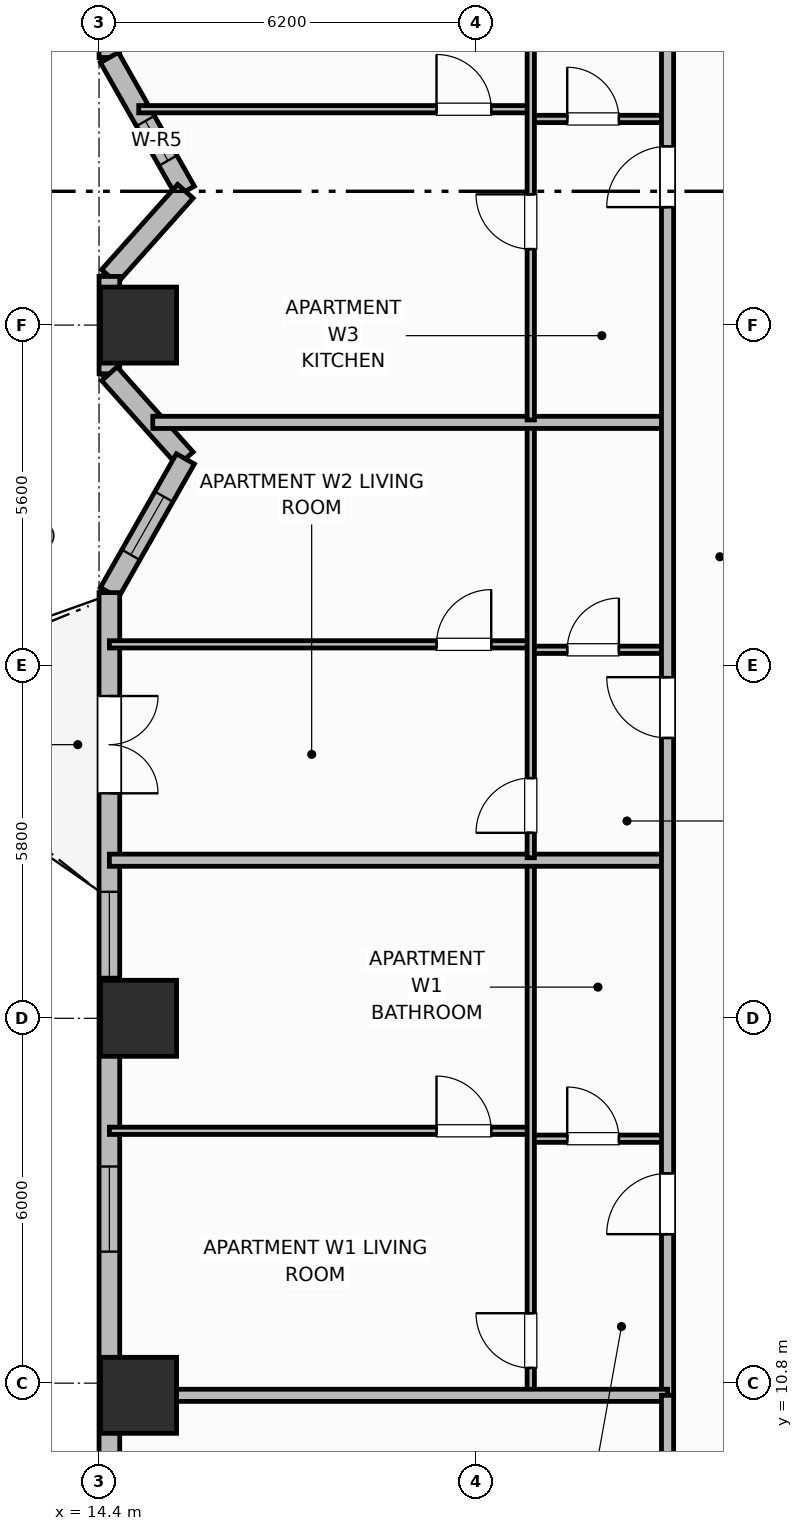
"""IFC4 building model, lengths in metres.
Left out: names, types, materials, properties, quantities, classifications, styles, units other than length and angle.
Written with IfcOpenShell. Run it as: python <this file> out.ifc"""

import sys

from ifc_helpers import new_model, si_unit, direction, frame, frame_2d, origin, origin_2d, place, context, subcontext, project, spatial, rectangle, extrude, element, fill, save


model = new_model("IFC4")
c1 = context("Model", 3, precision=1e-05, world=origin(), true_north=direction((0.0, 1.0)))
c2 = subcontext(c1, "Body", "Model", "MODEL_VIEW")
j1 = project(units=[si_unit("LENGTHUNIT", "METRE"), si_unit("PLANEANGLEUNIT", "RADIAN")], contexts=[c1])
p1 = place(None, origin())
s1 = spatial("IfcSite", under=j1, at=p1, CompositionType="ELEMENT")
p2 = place(p1, origin())
s2 = spatial("IfcBuilding", under=s1, at=p2, CompositionType="ELEMENT")
p3 = place(p2, frame((0.0, 0.0, 51.0)))
s3 = spatial("IfcBuildingStorey", under=s2, at=p3, CompositionType="ELEMENT", Elevation=51.0)
for number, where, z_axis, x_axis in (
    (1, (15.05, 10.6, 0.0), (0.0, 0.0, 1.0), (1.0, 0.0, 0.0)),
    (2, (15.05, 16.8, 0.0), (0.0, 0.0, 1.0), (1.0, 0.0, 0.0)),
    (3, (15.05, 28.2, 0.0), (0.0, 0.0, 1.0), (1.0, 0.0, 0.0)),
):
    element("IfcColumn", number, at=place(p3, frame(where, z_axis=z_axis, x_axis=x_axis)), inside=s3, PredefinedType="COLUMN", context=c2, shape_type="SweptSolid", body=[
        extrude(rectangle(XDim=1.25, YDim=1.25, at=origin_2d()), origin(), (0.0, 0.0, 1.0), 3.7),
    ])
p4 = place(p3, frame((14.57, 47.4, 0.0), z_axis=(0.0, 0.0, 1.0), x_axis=(0.0, -1.0, 0.0)))
e4 = element("IfcWall", 4, at=p4, inside=s3, PredefinedType="SOLIDWALL", context=c2, shape_type="SweptSolid", body=[
    extrude(rectangle(XDim=14.8, YDim=0.34, at=frame_2d((7.4, 0.0))), origin(), (0.0, 0.0, 1.0), 2.7),
])
p5 = place(p4, frame((3.863, 0.0, 0.68)))
e5 = element("IfcOpeningElement", 5, at=p5, cuts=e4, PredefinedType="OPENING", context=c2, shape_type="SweptSolid", body=[
    extrude(rectangle(XDim=1.6, YDim=1.9, at=frame_2d((0.8, 0.95))), frame((0.0, 0.18, 0.0), z_axis=(0.0, -1.0, 0.0), x_axis=(1.0, 0.0, 0.0)), (0.0, 0.0, 1.0), 0.36),
])
p6 = place(p4, frame((11.663, 0.0, 0.68)))
e6 = element("IfcOpeningElement", 6, at=p6, cuts=e4, PredefinedType="OPENING", context=c2, shape_type="SweptSolid", body=[
    extrude(rectangle(XDim=1.6, YDim=1.9, at=frame_2d((0.8, 0.95))), frame((0.0, 0.18, 0.0), z_axis=(0.0, -1.0, 0.0), x_axis=(1.0, 0.0, 0.0)), (0.0, 0.0, 1.0), 0.36),
])
p7 = place(p3, frame((14.57, 32.6, 0.0), z_axis=(0.0, 0.0, 1.0), x_axis=(0.493976255291, -0.869475393101, 0.0)))
e7 = element("IfcWall", 7, at=p7, inside=s3, PredefinedType="SOLIDWALL", context=c2, shape_type="SweptSolid", body=[
    extrude(rectangle(XDim=2.531, YDim=0.34, at=frame_2d((1.265, 0.0))), origin(), (0.0, 0.0, 1.0), 2.7),
])
p8 = place(p7, frame((1.2, 0.0, 0.89)))
e8 = element("IfcOpeningElement", 8, at=p8, cuts=e7, PredefinedType="OPENING", context=c2, shape_type="SweptSolid", body=[
    extrude(rectangle(XDim=0.75, YDim=1.65, at=frame_2d((0.375, 0.825))), frame((0.0, 0.18, 0.0), z_axis=(0.0, -1.0, 0.0), x_axis=(1.0, 0.0, 0.0)), (0.0, 0.0, 1.0), 0.36),
])
p9 = place(p3, frame((15.82, 30.4, 0.0), z_axis=(0.0, 0.0, 1.0), x_axis=(-0.666041619974, -0.74591457987, 0.0)))
e9 = element("IfcWall", 9, at=p9, inside=s3, PredefinedType="SOLIDWALL", context=c2, shape_type="SweptSolid", body=[
    extrude(rectangle(XDim=1.877, YDim=0.34, at=frame_2d((0.938, 0.0))), origin(), (0.0, 0.0, 1.0), 2.7),
])
p10 = place(p3, frame((14.57, 29.0, 0.0), z_axis=(0.0, 0.0, 1.0), x_axis=(0.0, -1.0, 0.0)))
e10 = element("IfcWall", 10, at=p10, inside=s3, PredefinedType="SOLIDWALL", context=c2, shape_type="SweptSolid", body=[
    extrude(rectangle(XDim=1.6, YDim=0.34, at=frame_2d((0.8, 0.0))), origin(), (0.0, 0.0, 1.0), 2.7),
])
p11 = place(p3, frame((14.57, 27.4, 0.0), z_axis=(0.0, 0.0, 1.0), x_axis=(0.666041619974, -0.74591457987, 0.0)))
e11 = element("IfcWall", 11, at=p11, inside=s3, PredefinedType="SOLIDWALL", context=c2, shape_type="SweptSolid", body=[
    extrude(rectangle(XDim=1.877, YDim=0.34, at=frame_2d((0.938, 0.0))), origin(), (0.0, 0.0, 1.0), 2.7),
])
p12 = place(p3, frame((15.82, 26.0, 0.0), z_axis=(0.0, 0.0, 1.0), x_axis=(-0.494017696272, -0.869451847873, 0.0)))
e12 = element("IfcWall", 12, at=p12, inside=s3, PredefinedType="SOLIDWALL", context=c2, shape_type="SweptSolid", body=[
    extrude(rectangle(XDim=2.53, YDim=0.34, at=frame_2d((1.265, 0.0))), origin(), (0.0, 0.0, 1.0), 2.7),
])
p13 = place(p12, frame((0.715, 0.0, 0.89)))
e13 = element("IfcOpeningElement", 13, at=p13, cuts=e12, PredefinedType="OPENING", context=c2, shape_type="SweptSolid", body=[
    extrude(rectangle(XDim=1.1, YDim=1.65, at=frame_2d((0.55, 0.825))), frame((0.0, 0.18, 0.0), z_axis=(0.0, -1.0, 0.0), x_axis=(1.0, 0.0, 0.0)), (0.0, 0.0, 1.0), 0.36),
])
p14 = place(p3, frame((14.57, 23.8, 0.0), z_axis=(0.0, 0.0, 1.0), x_axis=(0.0, -1.0, 0.0)))
e14 = element("IfcWall", 14, at=p14, inside=s3, PredefinedType="SOLIDWALL", context=c2, shape_type="SweptSolid", body=[
    extrude(rectangle(XDim=14.8, YDim=0.34, at=frame_2d((7.4, 0.0))), origin(), (0.0, 0.0, 1.0), 2.7),
])
p15 = place(p14, frame((1.7, 0.0, 0.0)))
e15 = element("IfcOpeningElement", 15, at=p15, cuts=e14, PredefinedType="OPENING", context=c2, shape_type="SweptSolid", body=[
    extrude(rectangle(XDim=1.6, YDim=2.1, at=frame_2d((0.8, 1.05))), frame((0.0, 0.18, 0.0), z_axis=(0.0, -1.0, 0.0), x_axis=(1.0, 0.0, 0.0)), (0.0, 0.0, 1.0), 0.36),
])
p16 = place(p14, frame((4.92, 0.0, 0.69)))
e16 = element("IfcOpeningElement", 16, at=p16, cuts=e14, PredefinedType="OPENING", context=c2, shape_type="SweptSolid", body=[
    extrude(rectangle(XDim=1.4, YDim=1.85, at=frame_2d((0.7, 0.925))), frame((0.0, 0.18, 0.0), z_axis=(0.0, -1.0, 0.0), x_axis=(1.0, 0.0, 0.0)), (0.0, 0.0, 1.0), 0.36),
])
p17 = place(p14, frame((9.438, 0.0, 0.73)))
e17 = element("IfcOpeningElement", 17, at=p17, cuts=e14, PredefinedType="OPENING", context=c2, shape_type="SweptSolid", body=[
    extrude(rectangle(XDim=1.4, YDim=1.85, at=frame_2d((0.7, 0.925))), frame((0.0, 0.18, 0.0), z_axis=(0.0, -1.0, 0.0), x_axis=(1.0, 0.0, 0.0)), (0.0, 0.0, 1.0), 0.36),
])
p18 = place(p3, frame((21.5, 14.82, 0.0), z_axis=(0.0, 0.0, 1.0), x_axis=(1.0, 0.0, 0.0)))
e18 = element("IfcWall", 18, at=p18, inside=s3, PredefinedType="PARTITIONING", context=c2, shape_type="SweptSolid", body=[
    extrude(rectangle(XDim=2.25, YDim=0.12, at=frame_2d((1.125, 0.0))), origin(), (0.0, 0.0, 1.0), 2.53),
])
p19 = place(p18, frame((0.6, 0.0, 0.0)))
e19 = element("IfcOpeningElement", 19, at=p19, cuts=e18, PredefinedType="OPENING", context=c2, shape_type="SweptSolid", body=[
    extrude(rectangle(XDim=0.85, YDim=2.1, at=frame_2d((0.425, 1.05))), frame((0.0, 0.07, 0.0), z_axis=(0.0, -1.0, 0.0), x_axis=(1.0, 0.0, 0.0)), (0.0, 0.0, 1.0), 0.14),
])
p20 = place(p3, frame((14.57, 14.95, 0.0), z_axis=(0.0, 0.0, 1.0), x_axis=(1.0, 0.0, 0.0)))
e20 = element("IfcWall", 20, at=p20, inside=s3, PredefinedType="PARTITIONING", context=c2, shape_type="SweptSolid", body=[
    extrude(rectangle(XDim=6.93, YDim=0.12, at=frame_2d((3.465, 0.0))), origin(), (0.0, 0.0, 1.0), 2.53),
])
p21 = place(p20, frame((5.38, 0.0, 0.0)))
e21 = element("IfcOpeningElement", 21, at=p21, cuts=e20, PredefinedType="OPENING", context=c2, shape_type="SweptSolid", body=[
    extrude(rectangle(XDim=0.9, YDim=2.1, at=frame_2d((0.45, 1.05))), frame((0.0, 0.07, 0.0), z_axis=(0.0, -1.0, 0.0), x_axis=(1.0, 0.0, 0.0)), (0.0, 0.0, 1.0), 0.14),
])
p22 = place(p3, frame((21.5, 10.64, 0.0), z_axis=(0.0, 0.0, 1.0), x_axis=(0.0, 1.0, 0.0)))
e22 = element("IfcWall", 22, at=p22, inside=s3, PredefinedType="PARTITIONING", context=c2, shape_type="SweptSolid", body=[
    extrude(rectangle(XDim=8.72, YDim=0.12, at=frame_2d((4.36, 0.0))), origin(), (0.0, 0.0, 1.0), 2.53),
])
p23 = place(p22, frame((0.41, 0.0, 0.0)))
e23 = element("IfcOpeningElement", 23, at=p23, cuts=e22, PredefinedType="OPENING", context=c2, shape_type="SweptSolid", body=[
    extrude(rectangle(XDim=0.9, YDim=2.1, at=frame_2d((0.45, 1.05))), frame((0.0, 0.07, 0.0), z_axis=(0.0, -1.0, 0.0), x_axis=(1.0, 0.0, 0.0)), (0.0, 0.0, 1.0), 0.14),
])
p24 = place(p3, frame((14.57, 19.4, 0.0), z_axis=(0.0, 0.0, 1.0), x_axis=(1.0, 0.0, 0.0)))
e24 = element("IfcWall", 24, at=p24, inside=s3, PredefinedType="PARTITIONING", context=c2, shape_type="SweptSolid", body=[
    extrude(rectangle(XDim=9.18, YDim=0.2, at=frame_2d((4.59, 0.0))), origin(), (0.0, 0.0, 1.0), 2.53),
])
p25 = place(p3, frame((21.5, 22.86, 0.0), z_axis=(0.0, 0.0, 1.0), x_axis=(1.0, 0.0, 0.0)))
e25 = element("IfcWall", 25, at=p25, inside=s3, PredefinedType="PARTITIONING", context=c2, shape_type="SweptSolid", body=[
    extrude(rectangle(XDim=2.25, YDim=0.12, at=frame_2d((1.125, 0.0))), origin(), (0.0, 0.0, 1.0), 2.53),
])
p26 = place(p25, frame((0.6, 0.0, 0.0)))
e26 = element("IfcOpeningElement", 26, at=p26, cuts=e25, PredefinedType="OPENING", context=c2, shape_type="SweptSolid", body=[
    extrude(rectangle(XDim=0.85, YDim=2.1, at=frame_2d((0.425, 1.05))), frame((0.0, 0.07, 0.0), z_axis=(0.0, -1.0, 0.0), x_axis=(1.0, 0.0, 0.0)), (0.0, 0.0, 1.0), 0.14),
])
p27 = place(p3, frame((14.57, 22.95, 0.0), z_axis=(0.0, 0.0, 1.0), x_axis=(1.0, 0.0, 0.0)))
e27 = element("IfcWall", 27, at=p27, inside=s3, PredefinedType="PARTITIONING", context=c2, shape_type="SweptSolid", body=[
    extrude(rectangle(XDim=6.93, YDim=0.12, at=frame_2d((3.465, 0.0))), origin(), (0.0, 0.0, 1.0), 2.53),
])
p28 = place(p27, frame((5.38, 0.0, 0.0)))
e28 = element("IfcOpeningElement", 28, at=p28, cuts=e27, PredefinedType="OPENING", context=c2, shape_type="SweptSolid", body=[
    extrude(rectangle(XDim=0.9, YDim=2.1, at=frame_2d((0.45, 1.05))), frame((0.0, 0.07, 0.0), z_axis=(0.0, -1.0, 0.0), x_axis=(1.0, 0.0, 0.0)), (0.0, 0.0, 1.0), 0.14),
])
p29 = place(p3, frame((21.5, 19.44, 0.0), z_axis=(0.0, 0.0, 1.0), x_axis=(0.0, 1.0, 0.0)))
e29 = element("IfcWall", 29, at=p29, inside=s3, PredefinedType="PARTITIONING", context=c2, shape_type="SweptSolid", body=[
    extrude(rectangle(XDim=7.12, YDim=0.12, at=frame_2d((3.56, 0.0))), origin(), (0.0, 0.0, 1.0), 2.53),
])
p30 = place(p29, frame((0.41, 0.0, 0.0)))
e30 = element("IfcOpeningElement", 30, at=p30, cuts=e29, PredefinedType="OPENING", context=c2, shape_type="SweptSolid", body=[
    extrude(rectangle(XDim=0.9, YDim=2.1, at=frame_2d((0.45, 1.05))), frame((0.0, 0.07, 0.0), z_axis=(0.0, -1.0, 0.0), x_axis=(1.0, 0.0, 0.0)), (0.0, 0.0, 1.0), 0.14),
])
p31 = place(p3, frame((15.284, 26.6, 0.0), z_axis=(0.0, 0.0, 1.0), x_axis=(1.0, 0.0, 0.0)))
e31 = element("IfcWall", 31, at=p31, inside=s3, PredefinedType="PARTITIONING", context=c2, shape_type="SweptSolid", body=[
    extrude(rectangle(XDim=8.466, YDim=0.2, at=frame_2d((4.233, 0.0))), origin(), (0.0, 0.0, 1.0), 2.53),
])
p32 = place(p3, frame((21.5, 31.59, 0.0), z_axis=(0.0, 0.0, 1.0), x_axis=(1.0, 0.0, 0.0)))
e32 = element("IfcWall", 32, at=p32, inside=s3, PredefinedType="PARTITIONING", context=c2, shape_type="SweptSolid", body=[
    extrude(rectangle(XDim=2.25, YDim=0.12, at=frame_2d((1.125, 0.0))), origin(), (0.0, 0.0, 1.0), 2.53),
])
p33 = place(p32, frame((0.6, 0.0, 0.0)))
e33 = element("IfcOpeningElement", 33, at=p33, cuts=e32, PredefinedType="OPENING", context=c2, shape_type="SweptSolid", body=[
    extrude(rectangle(XDim=0.85, YDim=2.1, at=frame_2d((0.425, 1.05))), frame((0.0, 0.07, 0.0), z_axis=(0.0, -1.0, 0.0), x_axis=(1.0, 0.0, 0.0)), (0.0, 0.0, 1.0), 0.14),
])
p34 = place(p3, frame((15.053, 31.75, 0.0), z_axis=(0.0, 0.0, 1.0), x_axis=(1.0, 0.0, 0.0)))
e34 = element("IfcWall", 34, at=p34, inside=s3, PredefinedType="PARTITIONING", context=c2, shape_type="SweptSolid", body=[
    extrude(rectangle(XDim=6.447, YDim=0.12, at=frame_2d((3.224, 0.0))), origin(), (0.0, 0.0, 1.0), 2.53),
])
p35 = place(p34, frame((4.897, 0.0, 0.0)))
e35 = element("IfcOpeningElement", 35, at=p35, cuts=e34, PredefinedType="OPENING", context=c2, shape_type="SweptSolid", body=[
    extrude(rectangle(XDim=0.9, YDim=2.1, at=frame_2d((0.45, 1.05))), frame((0.0, 0.07, 0.0), z_axis=(0.0, -1.0, 0.0), x_axis=(1.0, 0.0, 0.0)), (0.0, 0.0, 1.0), 0.14),
])
p36 = place(p3, frame((21.5, 26.64, 0.0), z_axis=(0.0, 0.0, 1.0), x_axis=(0.0, 1.0, 0.0)))
e36 = element("IfcWall", 36, at=p36, inside=s3, PredefinedType="PARTITIONING", context=c2, shape_type="SweptSolid", body=[
    extrude(rectangle(XDim=10.32, YDim=0.12, at=frame_2d((5.16, 0.0))), origin(), (0.0, 0.0, 1.0), 2.53),
])
p37 = place(p36, frame((2.81, 0.0, 0.0)))
e37 = element("IfcOpeningElement", 37, at=p37, cuts=e36, PredefinedType="OPENING", context=c2, shape_type="SweptSolid", body=[
    extrude(rectangle(XDim=0.9, YDim=2.1, at=frame_2d((0.45, 1.05))), frame((0.0, 0.07, 0.0), z_axis=(0.0, -1.0, 0.0), x_axis=(1.0, 0.0, 0.0)), (0.0, 0.0, 1.0), 0.14),
])
p38 = place(p3, frame((23.75, 10.6, 0.0), z_axis=(0.0, 0.0, 1.0), x_axis=(0.0, 1.0, 0.0)))
e38 = element("IfcWall", 38, at=p38, inside=s3, PredefinedType="PARTITIONING", context=c2, shape_type="SweptSolid", body=[
    extrude(rectangle(XDim=35.2, YDim=0.2, at=frame_2d((17.6, 0.0))), origin(), (0.0, 0.0, 1.0), 2.53),
])
p39 = place(p38, frame((2.65, 0.0, 0.0)))
e39 = element("IfcOpeningElement", 39, at=p39, cuts=e38, PredefinedType="OPENING", context=c2, shape_type="SweptSolid", body=[
    extrude(rectangle(XDim=1.0, YDim=2.15, at=frame_2d((0.5, 1.075))), frame((0.0, 0.11, 0.0), z_axis=(0.0, -1.0, 0.0), x_axis=(1.0, 0.0, 0.0)), (0.0, 0.0, 1.0), 0.22),
])
p40 = place(p38, frame((10.81, 0.0, 0.0)))
e40 = element("IfcOpeningElement", 40, at=p40, cuts=e38, PredefinedType="OPENING", context=c2, shape_type="SweptSolid", body=[
    extrude(rectangle(XDim=1.0, YDim=2.15, at=frame_2d((0.5, 1.075))), frame((0.0, 0.11, 0.0), z_axis=(0.0, -1.0, 0.0), x_axis=(1.0, 0.0, 0.0)), (0.0, 0.0, 1.0), 0.22),
])
p41 = place(p38, frame((19.54, 0.0, 0.0)))
e41 = element("IfcOpeningElement", 41, at=p41, cuts=e38, PredefinedType="OPENING", context=c2, shape_type="SweptSolid", body=[
    extrude(rectangle(XDim=1.0, YDim=2.15, at=frame_2d((0.5, 1.075))), frame((0.0, 0.11, 0.0), z_axis=(0.0, -1.0, 0.0), x_axis=(1.0, 0.0, 0.0)), (0.0, 0.0, 1.0), 0.22),
])
p42 = place(p38, frame((26.95, 0.0, 0.0)))
e42 = element("IfcOpeningElement", 42, at=p42, cuts=e38, PredefinedType="OPENING", context=c2, shape_type="SweptSolid", body=[
    extrude(rectangle(XDim=1.0, YDim=2.15, at=frame_2d((0.5, 1.075))), frame((0.0, 0.11, 0.0), z_axis=(0.0, -1.0, 0.0), x_axis=(1.0, 0.0, 0.0)), (0.0, 0.0, 1.0), 0.22),
])
p43 = place(p3, frame((14.99, 10.6, 0.0), z_axis=(0.0, 0.0, 1.0), x_axis=(1.0, 0.0, 0.0)))
e43 = element("IfcWall", 43, at=p43, inside=s3, PredefinedType="PARTITIONING", context=c2, shape_type="SweptSolid", body=[
    extrude(rectangle(XDim=8.76, YDim=0.2, at=frame_2d((4.38, 0.0))), origin(), (0.0, 0.0, 1.0), 2.53),
])
p44 = place(p3, frame((23.75, 4.97, 0.0), z_axis=(0.0, 0.0, 1.0), x_axis=(0.0, 1.0, 0.0)))
e44 = element("IfcWall", 44, at=p44, inside=s3, PredefinedType="PARTITIONING", context=c2, shape_type="SweptSolid", body=[
    extrude(rectangle(XDim=5.63, YDim=0.2, at=frame_2d((2.815, 0.0))), origin(), (0.0, 0.0, 1.0), 2.53),
])
p45 = place(p8, origin())
e45 = element("IfcWindow", 45, at=p45, inside=s3, PartitioningType="SINGLE_PANEL", PredefinedType="WINDOW", context=c2, shape_type="SweptSolid", body=[
    extrude(rectangle(XDim=0.75, YDim=1.65, at=frame_2d((0.375, 0.825))), frame((0.0, 0.03, 0.0), z_axis=(0.0, -1.0, 0.0), x_axis=(1.0, 0.0, 0.0)), (0.0, 0.0, 1.0), 0.06),
])
fill(e8, e45)
p46 = place(p13, origin())
e46 = element("IfcWindow", 46, at=p46, inside=s3, PartitioningType="SINGLE_PANEL", PredefinedType="WINDOW", context=c2, shape_type="SweptSolid", body=[
    extrude(rectangle(XDim=1.1, YDim=1.65, at=frame_2d((0.55, 0.825))), frame((0.0, 0.03, 0.0), z_axis=(0.0, -1.0, 0.0), x_axis=(1.0, 0.0, 0.0)), (0.0, 0.0, 1.0), 0.06),
])
fill(e13, e46)
p47 = place(p15, origin())
e47 = element("IfcDoor", 47, at=p47, inside=s3, OperationType="DOUBLE_DOOR_SINGLE_SWING", PredefinedType="DOOR", context=c2, shape_type="SweptSolid", body=[
    extrude(rectangle(XDim=1.6, YDim=2.1, at=frame_2d((0.8, 1.05))), frame((0.0, 0.025, 0.0), z_axis=(0.0, -1.0, 0.0), x_axis=(1.0, 0.0, 0.0)), (0.0, 0.0, 1.0), 0.05),
])
fill(e15, e47)
p48 = place(p16, origin())
e48 = element("IfcWindow", 48, at=p48, inside=s3, PartitioningType="SINGLE_PANEL", PredefinedType="WINDOW", context=c2, shape_type="SweptSolid", body=[
    extrude(rectangle(XDim=1.4, YDim=1.85, at=frame_2d((0.7, 0.925))), frame((0.0, 0.03, 0.0), z_axis=(0.0, -1.0, 0.0), x_axis=(1.0, 0.0, 0.0)), (0.0, 0.0, 1.0), 0.06),
])
fill(e16, e48)
p49 = place(p17, origin())
e49 = element("IfcWindow", 49, at=p49, inside=s3, PartitioningType="SINGLE_PANEL", PredefinedType="WINDOW", context=c2, shape_type="SweptSolid", body=[
    extrude(rectangle(XDim=1.4, YDim=1.85, at=frame_2d((0.7, 0.925))), frame((0.0, 0.03, 0.0), z_axis=(0.0, -1.0, 0.0), x_axis=(1.0, 0.0, 0.0)), (0.0, 0.0, 1.0), 0.06),
])
fill(e17, e49)
p50 = place(p19, origin())
e50 = element("IfcDoor", 50, at=p50, inside=s3, OperationType="SINGLE_SWING_LEFT", PredefinedType="DOOR", context=c2, shape_type="SweptSolid", body=[
    extrude(rectangle(XDim=0.85, YDim=2.1, at=frame_2d((0.425, 1.05))), frame((0.0, 0.025, 0.0), z_axis=(0.0, -1.0, 0.0), x_axis=(1.0, 0.0, 0.0)), (0.0, 0.0, 1.0), 0.05),
])
fill(e19, e50)
p51 = place(p21, origin())
e51 = element("IfcDoor", 51, at=p51, inside=s3, OperationType="SINGLE_SWING_LEFT", PredefinedType="DOOR", context=c2, shape_type="SweptSolid", body=[
    extrude(rectangle(XDim=0.9, YDim=2.1, at=frame_2d((0.45, 1.05))), frame((0.0, 0.025, 0.0), z_axis=(0.0, -1.0, 0.0), x_axis=(1.0, 0.0, 0.0)), (0.0, 0.0, 1.0), 0.05),
])
fill(e21, e51)
p52 = place(p23, origin())
e52 = element("IfcDoor", 52, at=p52, inside=s3, OperationType="SINGLE_SWING_RIGHT", PredefinedType="DOOR", context=c2, shape_type="SweptSolid", body=[
    extrude(rectangle(XDim=0.9, YDim=2.1, at=frame_2d((0.45, 1.05))), frame((0.0, 0.025, 0.0), z_axis=(0.0, -1.0, 0.0), x_axis=(1.0, 0.0, 0.0)), (0.0, 0.0, 1.0), 0.05),
])
fill(e23, e52)
p53 = place(p26, origin())
e53 = element("IfcDoor", 53, at=p53, inside=s3, OperationType="SINGLE_SWING_RIGHT", PredefinedType="DOOR", context=c2, shape_type="SweptSolid", body=[
    extrude(rectangle(XDim=0.85, YDim=2.1, at=frame_2d((0.425, 1.05))), frame((0.0, 0.025, 0.0), z_axis=(0.0, -1.0, 0.0), x_axis=(1.0, 0.0, 0.0)), (0.0, 0.0, 1.0), 0.05),
])
fill(e26, e53)
p54 = place(p28, origin())
e54 = element("IfcDoor", 54, at=p54, inside=s3, OperationType="SINGLE_SWING_RIGHT", PredefinedType="DOOR", context=c2, shape_type="SweptSolid", body=[
    extrude(rectangle(XDim=0.9, YDim=2.1, at=frame_2d((0.45, 1.05))), frame((0.0, 0.025, 0.0), z_axis=(0.0, -1.0, 0.0), x_axis=(1.0, 0.0, 0.0)), (0.0, 0.0, 1.0), 0.05),
])
fill(e28, e54)
p55 = place(p30, origin())
e55 = element("IfcDoor", 55, at=p55, inside=s3, OperationType="SINGLE_SWING_LEFT", PredefinedType="DOOR", context=c2, shape_type="SweptSolid", body=[
    extrude(rectangle(XDim=0.9, YDim=2.1, at=frame_2d((0.45, 1.05))), frame((0.0, 0.025, 0.0), z_axis=(0.0, -1.0, 0.0), x_axis=(1.0, 0.0, 0.0)), (0.0, 0.0, 1.0), 0.05),
])
fill(e30, e55)
p56 = place(p33, origin())
e56 = element("IfcDoor", 56, at=p56, inside=s3, OperationType="SINGLE_SWING_LEFT", PredefinedType="DOOR", context=c2, shape_type="SweptSolid", body=[
    extrude(rectangle(XDim=0.85, YDim=2.1, at=frame_2d((0.425, 1.05))), frame((0.0, 0.025, 0.0), z_axis=(0.0, -1.0, 0.0), x_axis=(1.0, 0.0, 0.0)), (0.0, 0.0, 1.0), 0.05),
])
fill(e33, e56)
p57 = place(p35, origin())
e57 = element("IfcDoor", 57, at=p57, inside=s3, OperationType="SINGLE_SWING_LEFT", PredefinedType="DOOR", context=c2, shape_type="SweptSolid", body=[
    extrude(rectangle(XDim=0.9, YDim=2.1, at=frame_2d((0.45, 1.05))), frame((0.0, 0.025, 0.0), z_axis=(0.0, -1.0, 0.0), x_axis=(1.0, 0.0, 0.0)), (0.0, 0.0, 1.0), 0.05),
])
fill(e35, e57)
p58 = place(p37, origin())
e58 = element("IfcDoor", 58, at=p58, inside=s3, OperationType="SINGLE_SWING_RIGHT", PredefinedType="DOOR", context=c2, shape_type="SweptSolid", body=[
    extrude(rectangle(XDim=0.9, YDim=2.1, at=frame_2d((0.45, 1.05))), frame((0.0, 0.025, 0.0), z_axis=(0.0, -1.0, 0.0), x_axis=(1.0, 0.0, 0.0)), (0.0, 0.0, 1.0), 0.05),
])
fill(e37, e58)
p59 = place(p39, origin())
e59 = element("IfcDoor", 59, at=p59, inside=s3, OperationType="SINGLE_SWING_LEFT", PredefinedType="DOOR", context=c2, shape_type="SweptSolid", body=[
    extrude(rectangle(XDim=1.0, YDim=2.15, at=frame_2d((0.5, 1.075))), frame((0.0, 0.025, 0.0), z_axis=(0.0, -1.0, 0.0), x_axis=(1.0, 0.0, 0.0)), (0.0, 0.0, 1.0), 0.05),
])
fill(e39, e59)
p60 = place(p40, origin())
e60 = element("IfcDoor", 60, at=p60, inside=s3, OperationType="SINGLE_SWING_RIGHT", PredefinedType="DOOR", context=c2, shape_type="SweptSolid", body=[
    extrude(rectangle(XDim=1.0, YDim=2.15, at=frame_2d((0.5, 1.075))), frame((0.0, 0.025, 0.0), z_axis=(0.0, -1.0, 0.0), x_axis=(1.0, 0.0, 0.0)), (0.0, 0.0, 1.0), 0.05),
])
fill(e40, e60)
p61 = place(p41, origin())
e61 = element("IfcDoor", 61, at=p61, inside=s3, OperationType="SINGLE_SWING_LEFT", PredefinedType="DOOR", context=c2, shape_type="SweptSolid", body=[
    extrude(rectangle(XDim=1.0, YDim=2.15, at=frame_2d((0.5, 1.075))), frame((0.0, 0.025, 0.0), z_axis=(0.0, -1.0, 0.0), x_axis=(1.0, 0.0, 0.0)), (0.0, 0.0, 1.0), 0.05),
])
fill(e41, e61)
save(model, sys.argv[1])
